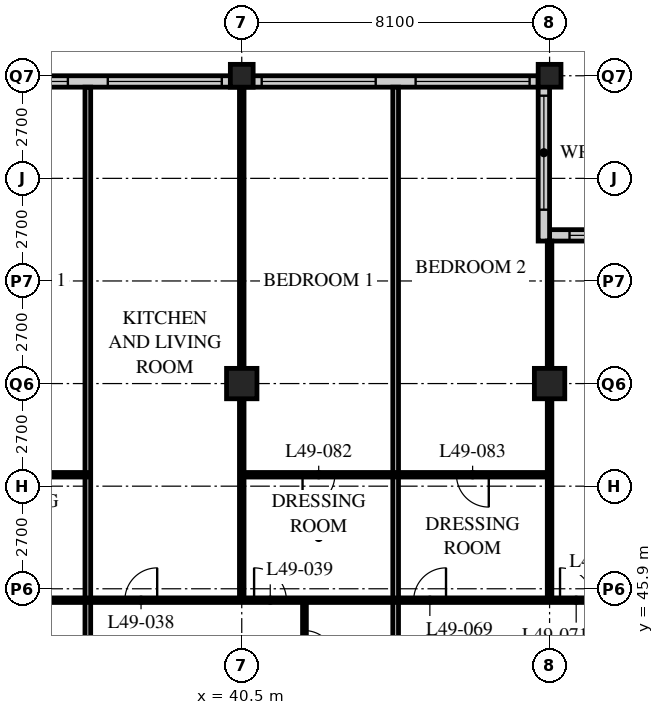
"""IFC4 building model, lengths in metres.
Left out: names, types, materials, properties, quantities, classifications, styles, units other than length and angle.
Written with IfcOpenShell. Run it as: python <this file> out.ifc"""

import sys

from ifc_helpers import new_model, si_unit, direction, frame, frame_2d, origin, origin_2d, place, context, subcontext, project, spatial, rectangle, hollow_rectangle, extrude, element, fill, save


model = new_model("IFC4")
c1 = context("Model", 3, precision=1e-05, world=origin(), true_north=direction((0.0, 1.0)))
c2 = subcontext(c1, "Body", "Model", "MODEL_VIEW")
j1 = project(units=[si_unit("LENGTHUNIT", "METRE"), si_unit("PLANEANGLEUNIT", "RADIAN")], contexts=[c1])
p1 = place(None, origin())
s1 = spatial("IfcSite", under=j1, at=p1, CompositionType="ELEMENT")
p2 = place(p1, origin())
s2 = spatial("IfcBuilding", under=s1, at=p2, CompositionType="ELEMENT")
p3 = place(p2, frame((0.0, 0.0, 192.0)))
s3 = spatial("IfcBuildingStorey", under=s2, at=p3, CompositionType="ELEMENT", Elevation=192.0)
p4 = place(p3, frame((40.5, 51.3, 0.0), z_axis=(0.0, 0.0, 1.0), x_axis=(1.0, 0.0, 0.0)))
e1 = element("IfcColumn", 1, at=p4, inside=s3, PredefinedType="COLUMN", context=c2, shape_type="SweptSolid", body=[
    extrude(hollow_rectangle(XDim=0.8, YDim=0.8, WallThickness=0.08, at=origin_2d()), origin(), (0.0, 0.0, 1.0), 3.6),
])
p5 = place(p3, frame((40.5, 59.4, 0.0), z_axis=(0.0, 0.0, 1.0), x_axis=(1.0, 0.0, 0.0)))
e2 = element("IfcColumn", 2, at=p5, inside=s3, PredefinedType="COLUMN", context=c2, shape_type="SweptSolid", body=[
    extrude(hollow_rectangle(XDim=0.6, YDim=0.6, WallThickness=0.05, at=origin_2d()), origin(), (0.0, 0.0, 1.0), 3.6),
])
p6 = place(p3, frame((48.6, 51.3, 0.0), z_axis=(0.0, 0.0, 1.0), x_axis=(1.0, 0.0, 0.0)))
e3 = element("IfcColumn", 3, at=p6, inside=s3, PredefinedType="COLUMN", context=c2, shape_type="SweptSolid", body=[
    extrude(hollow_rectangle(XDim=0.8, YDim=0.8, WallThickness=0.08, at=origin_2d()), origin(), (0.0, 0.0, 1.0), 3.6),
])
p7 = place(p3, frame((48.6, 59.4, 0.0), z_axis=(0.0, 0.0, 1.0), x_axis=(1.0, 0.0, 0.0)))
e4 = element("IfcColumn", 4, at=p7, inside=s3, PredefinedType="COLUMN", context=c2, shape_type="SweptSolid", body=[
    extrude(hollow_rectangle(XDim=0.6, YDim=0.6, WallThickness=0.05, at=origin_2d()), origin(), (0.0, 0.0, 1.0), 3.6),
])
p8 = place(p3, frame((52.35, 55.2, 0.0), z_axis=(0.0, 0.0, 1.0), x_axis=(-1.0, 0.0, 0.0)))
e5 = element("IfcWall", 5, at=p8, inside=s3, PredefinedType="SOLIDWALL", context=c2, shape_type="SweptSolid", body=[
    extrude(rectangle(XDim=3.75, YDim=0.3, at=frame_2d((1.875, 0.0))), origin(), (0.0, 0.0, 1.0), 3.39),
])
p9 = place(p8, frame((0.225, 0.0, 0.6)))
e6 = element("IfcOpeningElement", 6, at=p9, cuts=e5, PredefinedType="OPENING", context=c2, shape_type="SweptSolid", body=[
    extrude(rectangle(XDim=3.0, YDim=2.0, at=frame_2d((1.5, 1.0))), frame((0.0, 0.16, 0.0), z_axis=(0.0, -1.0, 0.0), x_axis=(1.0, 0.0, 0.0)), (0.0, 0.0, 1.0), 0.32),
])
p10 = place(p3, frame((48.45, 55.05, 0.0), z_axis=(0.0, 0.0, 1.0), x_axis=(0.0, 1.0, 0.0)))
e7 = element("IfcWall", 7, at=p10, inside=s3, PredefinedType="SOLIDWALL", context=c2, shape_type="SweptSolid", body=[
    extrude(rectangle(XDim=4.35, YDim=0.3, at=frame_2d((2.175, 0.0))), origin(), (0.0, 0.0, 1.0), 3.39),
])
p11 = place(p10, frame((0.825, 0.0, 0.6)))
e8 = element("IfcOpeningElement", 8, at=p11, cuts=e7, PredefinedType="OPENING", context=c2, shape_type="SweptSolid", body=[
    extrude(rectangle(XDim=3.0, YDim=2.0, at=frame_2d((1.5, 1.0))), frame((0.0, 0.16, 0.0), z_axis=(0.0, -1.0, 0.0), x_axis=(1.0, 0.0, 0.0)), (0.0, 0.0, 1.0), 0.32),
])
p12 = place(p3, frame((48.3, 59.25, 0.0), z_axis=(0.0, 0.0, 1.0), x_axis=(-1.0, 0.0, 0.0)))
e9 = element("IfcWall", 9, at=p12, inside=s3, PredefinedType="SOLIDWALL", context=c2, shape_type="SweptSolid", body=[
    extrude(rectangle(XDim=40.2, YDim=0.3, at=frame_2d((20.1, 0.0))), origin(), (0.0, 0.0, 1.0), 3.39),
])
p13 = place(p12, frame((0.225, 0.0, 0.6)))
e10 = element("IfcOpeningElement", 10, at=p13, cuts=e9, PredefinedType="OPENING", context=c2, shape_type="SweptSolid", body=[
    extrude(rectangle(XDim=3.0, YDim=2.4, at=frame_2d((1.5, 1.2))), frame((0.0, 0.16, 0.0), z_axis=(0.0, -1.0, 0.0), x_axis=(1.0, 0.0, 0.0)), (0.0, 0.0, 1.0), 0.32),
])
p14 = place(p12, frame((4.275, 0.0, 0.6)))
e11 = element("IfcOpeningElement", 11, at=p14, cuts=e9, PredefinedType="OPENING", context=c2, shape_type="SweptSolid", body=[
    extrude(rectangle(XDim=3.0, YDim=2.4, at=frame_2d((1.5, 1.2))), frame((0.0, 0.16, 0.0), z_axis=(0.0, -1.0, 0.0), x_axis=(1.0, 0.0, 0.0)), (0.0, 0.0, 1.0), 0.32),
])
p15 = place(p12, frame((8.325, 0.0, 0.6)))
e12 = element("IfcOpeningElement", 12, at=p15, cuts=e9, PredefinedType="OPENING", context=c2, shape_type="SweptSolid", body=[
    extrude(rectangle(XDim=3.0, YDim=2.4, at=frame_2d((1.5, 1.2))), frame((0.0, 0.16, 0.0), z_axis=(0.0, -1.0, 0.0), x_axis=(1.0, 0.0, 0.0)), (0.0, 0.0, 1.0), 0.32),
])
p16 = place(p12, frame((12.375, 0.0, 0.6)))
e13 = element("IfcOpeningElement", 13, at=p16, cuts=e9, PredefinedType="OPENING", context=c2, shape_type="SweptSolid", body=[
    extrude(rectangle(XDim=3.0, YDim=2.4, at=frame_2d((1.5, 1.2))), frame((0.0, 0.16, 0.0), z_axis=(0.0, -1.0, 0.0), x_axis=(1.0, 0.0, 0.0)), (0.0, 0.0, 1.0), 0.32),
])
p17 = place(p12, frame((16.425, 0.0, 0.6)))
e14 = element("IfcOpeningElement", 14, at=p17, cuts=e9, PredefinedType="OPENING", context=c2, shape_type="SweptSolid", body=[
    extrude(rectangle(XDim=3.0, YDim=2.4, at=frame_2d((1.5, 1.2))), frame((0.0, 0.16, 0.0), z_axis=(0.0, -1.0, 0.0), x_axis=(1.0, 0.0, 0.0)), (0.0, 0.0, 1.0), 0.32),
])
p18 = place(p12, frame((20.475, 0.0, 0.6)))
e15 = element("IfcOpeningElement", 15, at=p18, cuts=e9, PredefinedType="OPENING", context=c2, shape_type="SweptSolid", body=[
    extrude(rectangle(XDim=3.0, YDim=2.4, at=frame_2d((1.5, 1.2))), frame((0.0, 0.16, 0.0), z_axis=(0.0, -1.0, 0.0), x_axis=(1.0, 0.0, 0.0)), (0.0, 0.0, 1.0), 0.32),
])
p19 = place(p12, frame((24.525, 0.0, 0.6)))
e16 = element("IfcOpeningElement", 16, at=p19, cuts=e9, PredefinedType="OPENING", context=c2, shape_type="SweptSolid", body=[
    extrude(rectangle(XDim=3.0, YDim=2.4, at=frame_2d((1.5, 1.2))), frame((0.0, 0.16, 0.0), z_axis=(0.0, -1.0, 0.0), x_axis=(1.0, 0.0, 0.0)), (0.0, 0.0, 1.0), 0.32),
])
p20 = place(p12, frame((28.575, 0.0, 0.6)))
e17 = element("IfcOpeningElement", 17, at=p20, cuts=e9, PredefinedType="OPENING", context=c2, shape_type="SweptSolid", body=[
    extrude(rectangle(XDim=3.0, YDim=2.4, at=frame_2d((1.5, 1.2))), frame((0.0, 0.16, 0.0), z_axis=(0.0, -1.0, 0.0), x_axis=(1.0, 0.0, 0.0)), (0.0, 0.0, 1.0), 0.32),
])
p21 = place(p12, frame((32.625, 0.0, 0.6)))
e18 = element("IfcOpeningElement", 18, at=p21, cuts=e9, PredefinedType="OPENING", context=c2, shape_type="SweptSolid", body=[
    extrude(rectangle(XDim=3.0, YDim=2.4, at=frame_2d((1.5, 1.2))), frame((0.0, 0.16, 0.0), z_axis=(0.0, -1.0, 0.0), x_axis=(1.0, 0.0, 0.0)), (0.0, 0.0, 1.0), 0.32),
])
p22 = place(p12, frame((36.675, 0.0, 0.6)))
e19 = element("IfcOpeningElement", 19, at=p22, cuts=e9, PredefinedType="OPENING", context=c2, shape_type="SweptSolid", body=[
    extrude(rectangle(XDim=3.0, YDim=2.4, at=frame_2d((1.5, 1.2))), frame((0.0, 0.16, 0.0), z_axis=(0.0, -1.0, 0.0), x_axis=(1.0, 0.0, 0.0)), (0.0, 0.0, 1.0), 0.32),
])
p23 = place(p3, frame((36.45, 43.2, 0.0), z_axis=(0.0, 0.0, 1.0), x_axis=(0.0, 1.0, 0.0)))
e20 = element("IfcWall", 20, at=p23, inside=s3, PredefinedType="PARTITIONING", context=c2, shape_type="SweptSolid", body=[
    extrude(rectangle(XDim=15.9, YDim=0.15, at=frame_2d((7.95, 0.0))), origin(), (0.0, 0.0, 1.0), 3.39),
])
p24 = place(p3, frame((42.15, 43.2, 0.0), z_axis=(0.0, 0.0, 1.0), x_axis=(0.0, 1.0, 0.0)))
e21 = element("IfcWall", 21, at=p24, inside=s3, PredefinedType="PARTITIONING", context=c2, shape_type="SweptSolid", body=[
    extrude(rectangle(XDim=2.4, YDim=0.1, at=frame_2d((1.2, 0.0))), origin(), (0.0, 0.0, 1.0), 3.39),
])
p25 = place(p24, frame((0.8, 0.0, 0.0)))
e22 = element("IfcOpeningElement", 22, at=p25, cuts=e21, PredefinedType="OPENING", context=c2, shape_type="SweptSolid", body=[
    extrude(rectangle(XDim=0.8, YDim=2.1, at=frame_2d((0.4, 1.05))), frame((0.0, 0.06, 0.0), z_axis=(0.0, -1.0, 0.0), x_axis=(1.0, 0.0, 0.0)), (0.0, 0.0, 1.0), 0.12),
])
p26 = place(p3, frame((40.5, 45.6, 0.0), z_axis=(0.0, 0.0, 1.0), x_axis=(0.0, 1.0, 0.0)))
e23 = element("IfcWall", 23, at=p26, inside=s3, PredefinedType="PARTITIONING", context=c2, shape_type="SweptSolid", body=[
    extrude(rectangle(XDim=13.5, YDim=0.12, at=frame_2d((6.75, 0.0))), origin(), (0.0, 0.0, 1.0), 2.778),
])
p27 = place(p3, frame((48.6, 45.6, 0.0), z_axis=(0.0, 0.0, 1.0), x_axis=(0.0, 1.0, 0.0)))
e24 = element("IfcWall", 24, at=p27, inside=s3, PredefinedType="PARTITIONING", context=c2, shape_type="SweptSolid", body=[
    extrude(rectangle(XDim=9.45, YDim=0.12, at=frame_2d((4.725, 0.0))), origin(), (0.0, 0.0, 1.0), 2.778),
])
p28 = place(p3, frame((44.55, 43.2, 0.0), z_axis=(0.0, 0.0, 1.0), x_axis=(0.0, 1.0, 0.0)))
e25 = element("IfcWall", 25, at=p28, inside=s3, PredefinedType="PARTITIONING", context=c2, shape_type="SweptSolid", body=[
    extrude(rectangle(XDim=15.9, YDim=0.15, at=frame_2d((7.95, 0.0))), origin(), (0.0, 0.0, 1.0), 3.39),
])
p29 = place(p3, frame((4.1, 45.6, 0.0), z_axis=(0.0, 0.0, 1.0), x_axis=(1.0, 0.0, 0.0)))
e26 = element("IfcWall", 26, at=p29, inside=s3, PredefinedType="PARTITIONING", context=c2, shape_type="SweptSolid", body=[
    extrude(rectangle(XDim=48.5, YDim=0.12, at=frame_2d((24.25, 0.0))), origin(), (0.0, 0.0, 1.0), 3.39),
])
p30 = place(p29, frame((9.025, 0.0, 0.0)))
e27 = element("IfcOpeningElement", 27, at=p30, cuts=e26, PredefinedType="OPENING", context=c2, shape_type="SweptSolid", body=[
    extrude(rectangle(XDim=0.85, YDim=2.1, at=frame_2d((0.425, 1.05))), frame((0.0, 0.07, 0.0), z_axis=(0.0, -1.0, 0.0), x_axis=(1.0, 0.0, 0.0)), (0.0, 0.0, 1.0), 0.14),
])
p31 = place(p29, frame((16.475, 0.0, 0.0)))
e28 = element("IfcOpeningElement", 28, at=p31, cuts=e26, PredefinedType="OPENING", context=c2, shape_type="SweptSolid", body=[
    extrude(rectangle(XDim=0.85, YDim=2.1, at=frame_2d((0.425, 1.05))), frame((0.0, 0.07, 0.0), z_axis=(0.0, -1.0, 0.0), x_axis=(1.0, 0.0, 0.0)), (0.0, 0.0, 1.0), 0.14),
])
p32 = place(p29, frame((20.525, 0.0, 0.0)))
e29 = element("IfcOpeningElement", 29, at=p32, cuts=e26, PredefinedType="OPENING", context=c2, shape_type="SweptSolid", body=[
    extrude(rectangle(XDim=0.85, YDim=2.1, at=frame_2d((0.425, 1.05))), frame((0.0, 0.07, 0.0), z_axis=(0.0, -1.0, 0.0), x_axis=(1.0, 0.0, 0.0)), (0.0, 0.0, 1.0), 0.14),
])
p33 = place(p29, frame((25.225, 0.0, 0.0)))
e30 = element("IfcOpeningElement", 30, at=p33, cuts=e26, PredefinedType="OPENING", context=c2, shape_type="SweptSolid", body=[
    extrude(rectangle(XDim=0.85, YDim=2.1, at=frame_2d((0.425, 1.05))), frame((0.0, 0.07, 0.0), z_axis=(0.0, -1.0, 0.0), x_axis=(1.0, 0.0, 0.0)), (0.0, 0.0, 1.0), 0.14),
])
p34 = place(p29, frame((28.625, 0.0, 0.0)))
e31 = element("IfcOpeningElement", 31, at=p34, cuts=e26, PredefinedType="OPENING", context=c2, shape_type="SweptSolid", body=[
    extrude(rectangle(XDim=0.85, YDim=2.1, at=frame_2d((0.425, 1.05))), frame((0.0, 0.07, 0.0), z_axis=(0.0, -1.0, 0.0), x_axis=(1.0, 0.0, 0.0)), (0.0, 0.0, 1.0), 0.14),
])
p35 = place(p29, frame((33.325, 0.0, 0.0)))
e32 = element("IfcOpeningElement", 32, at=p35, cuts=e26, PredefinedType="OPENING", context=c2, shape_type="SweptSolid", body=[
    extrude(rectangle(XDim=0.85, YDim=2.1, at=frame_2d((0.425, 1.05))), frame((0.0, 0.07, 0.0), z_axis=(0.0, -1.0, 0.0), x_axis=(1.0, 0.0, 0.0)), (0.0, 0.0, 1.0), 0.14),
])
p36 = place(p29, frame((36.725, 0.0, 0.0)))
e33 = element("IfcOpeningElement", 33, at=p36, cuts=e26, PredefinedType="OPENING", context=c2, shape_type="SweptSolid", body=[
    extrude(rectangle(XDim=0.85, YDim=2.1, at=frame_2d((0.425, 1.05))), frame((0.0, 0.07, 0.0), z_axis=(0.0, -1.0, 0.0), x_axis=(1.0, 0.0, 0.0)), (0.0, 0.0, 1.0), 0.14),
])
p37 = place(p29, frame((40.925, 0.0, 0.0)))
e34 = element("IfcOpeningElement", 34, at=p37, cuts=e26, PredefinedType="OPENING", context=c2, shape_type="SweptSolid", body=[
    extrude(rectangle(XDim=0.85, YDim=2.1, at=frame_2d((0.425, 1.05))), frame((0.0, 0.07, 0.0), z_axis=(0.0, -1.0, 0.0), x_axis=(1.0, 0.0, 0.0)), (0.0, 0.0, 1.0), 0.14),
])
p38 = place(p29, frame((44.775, 0.0, 0.0)))
e35 = element("IfcOpeningElement", 35, at=p38, cuts=e26, PredefinedType="OPENING", context=c2, shape_type="SweptSolid", body=[
    extrude(rectangle(XDim=0.85, YDim=2.1, at=frame_2d((0.425, 1.05))), frame((0.0, 0.07, 0.0), z_axis=(0.0, -1.0, 0.0), x_axis=(1.0, 0.0, 0.0)), (0.0, 0.0, 1.0), 0.14),
])
p39 = place(p29, frame((6.725, 0.0, 0.0)))
e36 = element("IfcOpeningElement", 36, at=p39, cuts=e26, PredefinedType="OPENING", context=c2, shape_type="SweptSolid", body=[
    extrude(rectangle(XDim=0.85, YDim=2.1, at=frame_2d((0.425, 1.05))), frame((0.0, 0.07, 0.0), z_axis=(0.0, -1.0, 0.0), x_axis=(1.0, 0.0, 0.0)), (0.0, 0.0, 1.0), 0.14),
])
p40 = place(p29, frame((2.875, 0.0, 0.0)))
e37 = element("IfcOpeningElement", 37, at=p40, cuts=e26, PredefinedType="OPENING", context=c2, shape_type="SweptSolid", body=[
    extrude(rectangle(XDim=0.85, YDim=2.1, at=frame_2d((0.425, 1.05))), frame((0.0, 0.07, 0.0), z_axis=(0.0, -1.0, 0.0), x_axis=(1.0, 0.0, 0.0)), (0.0, 0.0, 1.0), 0.14),
])
p41 = place(p3, frame((32.4, 48.9, 0.0), z_axis=(0.0, 0.0, 1.0), x_axis=(1.0, 0.0, 0.0)))
e38 = element("IfcWall", 38, at=p41, inside=s3, PredefinedType="PARTITIONING", context=c2, shape_type="SweptSolid", body=[
    extrude(rectangle(XDim=4.05, YDim=0.12, at=frame_2d((2.025, 0.0))), origin(), (0.0, 0.0, 1.0), 3.39),
])
p42 = place(p41, frame((1.6, 0.0, 0.0)))
e39 = element("IfcOpeningElement", 39, at=p42, cuts=e38, PredefinedType="OPENING", context=c2, shape_type="SweptSolid", body=[
    extrude(rectangle(XDim=0.85, YDim=2.1, at=frame_2d((0.425, 1.05))), frame((0.0, 0.07, 0.0), z_axis=(0.0, -1.0, 0.0), x_axis=(1.0, 0.0, 0.0)), (0.0, 0.0, 1.0), 0.14),
])
p43 = place(p3, frame((40.5, 48.9, 0.0), z_axis=(0.0, 0.0, 1.0), x_axis=(1.0, 0.0, 0.0)))
e40 = element("IfcWall", 40, at=p43, inside=s3, PredefinedType="PARTITIONING", context=c2, shape_type="SweptSolid", body=[
    extrude(rectangle(XDim=8.1, YDim=0.12, at=frame_2d((4.05, 0.0))), origin(), (0.0, 0.0, 1.0), 3.39),
])
p44 = place(p43, frame((1.6, 0.0, 0.0)))
e41 = element("IfcOpeningElement", 41, at=p44, cuts=e40, PredefinedType="OPENING", context=c2, shape_type="SweptSolid", body=[
    extrude(rectangle(XDim=0.85, YDim=2.1, at=frame_2d((0.425, 1.05))), frame((0.0, 0.07, 0.0), z_axis=(0.0, -1.0, 0.0), x_axis=(1.0, 0.0, 0.0)), (0.0, 0.0, 1.0), 0.14),
])
p45 = place(p43, frame((5.65, 0.0, 0.0)))
e42 = element("IfcOpeningElement", 42, at=p45, cuts=e40, PredefinedType="OPENING", context=c2, shape_type="SweptSolid", body=[
    extrude(rectangle(XDim=0.85, YDim=2.1, at=frame_2d((0.425, 1.05))), frame((0.0, 0.07, 0.0), z_axis=(0.0, -1.0, 0.0), x_axis=(1.0, 0.0, 0.0)), (0.0, 0.0, 1.0), 0.14),
])
p46 = place(p9, origin())
e43 = element("IfcWindow", 43, at=p46, inside=s3, PartitioningType="SINGLE_PANEL", PredefinedType="WINDOW", context=c2, shape_type="SweptSolid", body=[
    extrude(rectangle(XDim=3.0, YDim=2.0, at=frame_2d((1.5, 1.0))), frame((0.0, 0.03, 0.0), z_axis=(0.0, -1.0, 0.0), x_axis=(1.0, 0.0, 0.0)), (0.0, 0.0, 1.0), 0.06),
])
fill(e6, e43)
p47 = place(p11, origin())
e44 = element("IfcWindow", 44, at=p47, inside=s3, PartitioningType="SINGLE_PANEL", PredefinedType="WINDOW", context=c2, shape_type="SweptSolid", body=[
    extrude(rectangle(XDim=3.0, YDim=2.0, at=frame_2d((1.5, 1.0))), frame((0.0, 0.03, 0.0), z_axis=(0.0, -1.0, 0.0), x_axis=(1.0, 0.0, 0.0)), (0.0, 0.0, 1.0), 0.06),
])
fill(e8, e44)
p48 = place(p13, origin())
e45 = element("IfcWindow", 45, at=p48, inside=s3, PartitioningType="SINGLE_PANEL", PredefinedType="WINDOW", context=c2, shape_type="SweptSolid", body=[
    extrude(rectangle(XDim=3.0, YDim=2.4, at=frame_2d((1.5, 1.2))), frame((0.0, 0.03, 0.0), z_axis=(0.0, -1.0, 0.0), x_axis=(1.0, 0.0, 0.0)), (0.0, 0.0, 1.0), 0.06),
])
fill(e10, e45)
p49 = place(p14, origin())
e46 = element("IfcWindow", 46, at=p49, inside=s3, PartitioningType="SINGLE_PANEL", PredefinedType="WINDOW", context=c2, shape_type="SweptSolid", body=[
    extrude(rectangle(XDim=3.0, YDim=2.4, at=frame_2d((1.5, 1.2))), frame((0.0, 0.03, 0.0), z_axis=(0.0, -1.0, 0.0), x_axis=(1.0, 0.0, 0.0)), (0.0, 0.0, 1.0), 0.06),
])
fill(e11, e46)
p50 = place(p15, origin())
e47 = element("IfcWindow", 47, at=p50, inside=s3, PartitioningType="SINGLE_PANEL", PredefinedType="WINDOW", context=c2, shape_type="SweptSolid", body=[
    extrude(rectangle(XDim=3.0, YDim=2.4, at=frame_2d((1.5, 1.2))), frame((0.0, 0.03, 0.0), z_axis=(0.0, -1.0, 0.0), x_axis=(1.0, 0.0, 0.0)), (0.0, 0.0, 1.0), 0.06),
])
fill(e12, e47)
p51 = place(p16, origin())
e48 = element("IfcWindow", 48, at=p51, inside=s3, PartitioningType="SINGLE_PANEL", PredefinedType="WINDOW", context=c2, shape_type="SweptSolid", body=[
    extrude(rectangle(XDim=3.0, YDim=2.4, at=frame_2d((1.5, 1.2))), frame((0.0, 0.03, 0.0), z_axis=(0.0, -1.0, 0.0), x_axis=(1.0, 0.0, 0.0)), (0.0, 0.0, 1.0), 0.06),
])
fill(e13, e48)
p52 = place(p25, origin())
e49 = element("IfcDoor", 49, at=p52, inside=s3, OperationType="SINGLE_SWING_RIGHT", PredefinedType="DOOR", context=c2, shape_type="SweptSolid", body=[
    extrude(rectangle(XDim=0.8, YDim=2.1, at=frame_2d((0.4, 1.05))), frame((0.0, 0.025, 0.0), z_axis=(0.0, -1.0, 0.0), x_axis=(1.0, 0.0, 0.0)), (0.0, 0.0, 1.0), 0.05),
])
fill(e22, e49)
p53 = place(p35, origin())
e50 = element("IfcDoor", 50, at=p53, inside=s3, OperationType="SINGLE_SWING_RIGHT", PredefinedType="DOOR", context=c2, shape_type="SweptSolid", body=[
    extrude(rectangle(XDim=0.85, YDim=2.1, at=frame_2d((0.425, 1.05))), frame((0.0, 0.025, 0.0), z_axis=(0.0, -1.0, 0.0), x_axis=(1.0, 0.0, 0.0)), (0.0, 0.0, 1.0), 0.05),
])
fill(e32, e50)
p54 = place(p36, origin())
e51 = element("IfcDoor", 51, at=p54, inside=s3, OperationType="SINGLE_SWING_LEFT", PredefinedType="DOOR", context=c2, shape_type="SweptSolid", body=[
    extrude(rectangle(XDim=0.85, YDim=2.1, at=frame_2d((0.425, 1.05))), frame((0.0, 0.025, 0.0), z_axis=(0.0, -1.0, 0.0), x_axis=(1.0, 0.0, 0.0)), (0.0, 0.0, 1.0), 0.05),
])
fill(e33, e51)
p55 = place(p37, origin())
e52 = element("IfcDoor", 52, at=p55, inside=s3, OperationType="SINGLE_SWING_RIGHT", PredefinedType="DOOR", context=c2, shape_type="SweptSolid", body=[
    extrude(rectangle(XDim=0.85, YDim=2.1, at=frame_2d((0.425, 1.05))), frame((0.0, 0.025, 0.0), z_axis=(0.0, -1.0, 0.0), x_axis=(1.0, 0.0, 0.0)), (0.0, 0.0, 1.0), 0.05),
])
fill(e34, e52)
p56 = place(p38, origin())
e53 = element("IfcDoor", 53, at=p56, inside=s3, OperationType="SINGLE_SWING_LEFT", PredefinedType="DOOR", context=c2, shape_type="SweptSolid", body=[
    extrude(rectangle(XDim=0.85, YDim=2.1, at=frame_2d((0.425, 1.05))), frame((0.0, 0.025, 0.0), z_axis=(0.0, -1.0, 0.0), x_axis=(1.0, 0.0, 0.0)), (0.0, 0.0, 1.0), 0.05),
])
fill(e35, e53)
p57 = place(p44, origin())
e54 = element("IfcDoor", 54, at=p57, inside=s3, OperationType="SINGLE_SWING_RIGHT", PredefinedType="DOOR", context=c2, shape_type="SweptSolid", body=[
    extrude(rectangle(XDim=0.85, YDim=2.1, at=frame_2d((0.425, 1.05))), frame((0.0, 0.025, 0.0), z_axis=(0.0, -1.0, 0.0), x_axis=(1.0, 0.0, 0.0)), (0.0, 0.0, 1.0), 0.05),
])
fill(e41, e54)
p58 = place(p45, origin())
e55 = element("IfcDoor", 55, at=p58, inside=s3, OperationType="SINGLE_SWING_LEFT", PredefinedType="DOOR", context=c2, shape_type="SweptSolid", body=[
    extrude(rectangle(XDim=0.85, YDim=2.1, at=frame_2d((0.425, 1.05))), frame((0.0, 0.025, 0.0), z_axis=(0.0, -1.0, 0.0), x_axis=(1.0, 0.0, 0.0)), (0.0, 0.0, 1.0), 0.05),
])
fill(e42, e55)
save(model, sys.argv[1])
